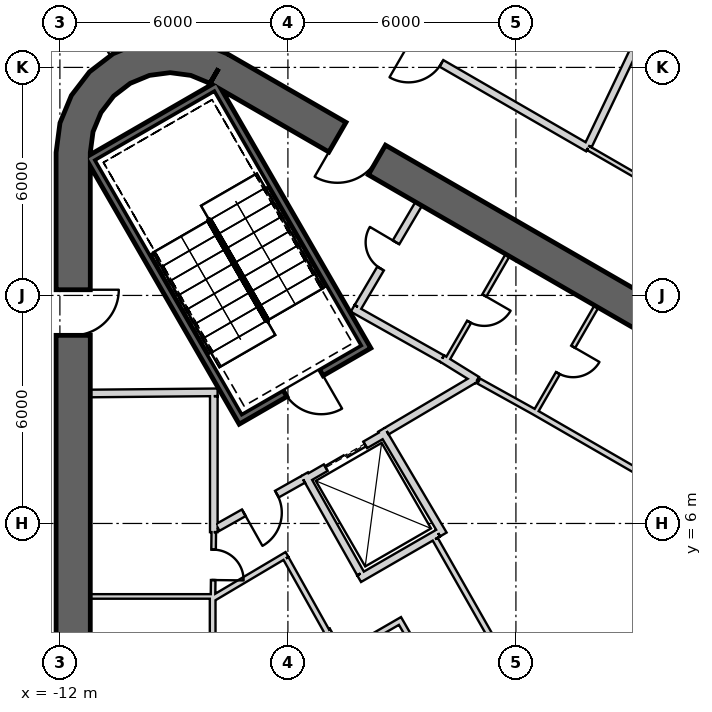
"""IFC4 building model, lengths in metres.
Left out: names, types, materials, properties, quantities, classifications, styles, units other than length and angle.
Written with IfcOpenShell. Run it as: python <this file> out.ifc"""

import sys

from ifc_helpers import new_model, si_unit, direction, frame, frame_2d, origin, place, context, subcontext, project, spatial, polyline, rectangle, outline, extrude, element, fill, save


model = new_model("IFC4")
c1 = context("Model", 3, precision=1e-05, world=origin(), true_north=direction((0.0, 1.0)))
c2 = subcontext(c1, "Body", "Model", "MODEL_VIEW")
j1 = project(units=[si_unit("LENGTHUNIT", "METRE"), si_unit("PLANEANGLEUNIT", "RADIAN")], contexts=[c1])
p1 = place(None, origin())
s1 = spatial("IfcSite", under=j1, at=p1, CompositionType="ELEMENT")
p2 = place(p1, origin())
s2 = spatial("IfcBuilding", under=s1, at=p2, CompositionType="ELEMENT")
p3 = place(p2, frame((0.0, 0.0, 404.8)))
s3 = spatial("IfcBuildingStorey", under=s2, at=p3, CompositionType="ELEMENT", Elevation=404.8)
p4 = place(p3, frame((19.475, 2.208, 0.0), z_axis=(0.0, 0.0, 1.0), x_axis=(-0.866028369851, 0.499994862586, 0.0)))
e1 = element("IfcWall", 1, at=p4, inside=s3, PredefinedType="SHEAR", context=c2, shape_type="SweptSolid", body=[
    extrude(rectangle(XDim=31.523, YDim=0.9, at=frame_2d((15.762, 0.0))), origin(), (0.0, 0.0, 1.0), 5.5),
])
p5 = place(p4, frame((3.612, 0.0, 0.0)))
e2 = element("IfcOpeningElement", 2, at=p5, cuts=e1, PredefinedType="OPENING", context=c2, shape_type="SweptSolid", body=[
    extrude(rectangle(XDim=1.2, YDim=2.4, at=frame_2d((0.6, 1.2))), frame((0.0, 0.46, 0.0), z_axis=(0.0, -1.0, 0.0), x_axis=(1.0, 0.0, 0.0)), (0.0, 0.0, 1.0), 0.92),
])
p6 = place(p4, frame((26.712, 0.0, 0.0)))
e3 = element("IfcOpeningElement", 3, at=p6, cuts=e1, PredefinedType="OPENING", context=c2, shape_type="SweptSolid", body=[
    extrude(rectangle(XDim=1.2, YDim=2.4, at=frame_2d((0.6, 1.2))), frame((0.0, 0.46, 0.0), z_axis=(0.0, -1.0, 0.0), x_axis=(1.0, 0.0, 0.0)), (0.0, 0.0, 1.0), 0.92),
])
p7 = place(p3, frame((-11.65, 15.762, 0.0), z_axis=(0.0, 0.0, 1.0), x_axis=(0.0, -1.0, 0.0)))
e4 = element("IfcWall", 4, at=p7, inside=s3, PredefinedType="SHEAR", context=c2, shape_type="SweptSolid", body=[
    extrude(rectangle(XDim=31.523, YDim=0.9, at=frame_2d((15.762, 0.0))), origin(), (0.0, 0.0, 1.0), 5.5),
])
p8 = place(p7, frame((3.612, 0.0, 0.0)))
e5 = element("IfcOpeningElement", 5, at=p8, cuts=e4, PredefinedType="OPENING", context=c2, shape_type="SweptSolid", body=[
    extrude(rectangle(XDim=1.2, YDim=2.4, at=frame_2d((0.6, 1.2))), frame((0.0, 0.46, 0.0), z_axis=(0.0, -1.0, 0.0), x_axis=(1.0, 0.0, 0.0)), (0.0, 0.0, 1.0), 0.92),
])
p9 = place(p7, frame((26.712, 0.0, 0.0)))
e6 = element("IfcOpeningElement", 6, at=p9, cuts=e4, PredefinedType="OPENING", context=c2, shape_type="SweptSolid", body=[
    extrude(rectangle(XDim=1.2, YDim=2.4, at=frame_2d((0.6, 1.2))), frame((0.0, 0.46, 0.0), z_axis=(0.0, -1.0, 0.0), x_axis=(1.0, 0.0, 0.0)), (0.0, 0.0, 1.0), 0.92),
])
p10 = place(p3, origin())
e7 = element("IfcWall", 7, at=p10, inside=s3, PredefinedType="SHEAR", context=c2, shape_type="SweptSolid", body=[
    extrude(outline(polyline([(-7.6, 18.36), (-8.323, 18.659), (-9.1, 18.762), (-9.876, 18.659), (-10.6, 18.36), (-11.221, 17.883), (-11.698, 17.262), (-11.998, 16.538), (-12.1, 15.762), (-11.2, 15.762), (-11.128, 16.305), (-10.919, 16.812), (-10.585, 17.247), (-10.15, 17.58), (-9.644, 17.79), (-9.1, 17.862), (-8.556, 17.79), (-8.05, 17.58), (-7.6, 18.36)])), origin(), (0.0, 0.0, 1.0), 5.5),
])
p11 = place(p3, frame((-11.245, 15.678, -0.3), z_axis=(0.0, 0.0, 1.0), x_axis=(0.499977274689, -0.866038523851, 0.0)))
e8 = element("IfcWall", 8, at=p11, inside=s3, PredefinedType="SHEAR", context=c2, shape_type="SweptSolid", body=[
    extrude(rectangle(XDim=8.1, YDim=0.2, at=frame_2d((4.05, 0.0))), origin(), (0.0, 0.0, 1.0), 5.55),
])
p12 = place(p3, frame((-7.818, 17.541, -0.3), z_axis=(0.0, 0.0, 1.0), x_axis=(-0.866044365799, -0.499967155389, 0.0)))
e9 = element("IfcWall", 9, at=p12, inside=s3, PredefinedType="SHEAR", context=c2, shape_type="SweptSolid", body=[
    extrude(rectangle(XDim=3.8, YDim=0.2, at=frame_2d((1.9, 0.0))), origin(), (0.0, 0.0, 1.0), 5.55),
])
p13 = place(p3, frame((-7.854, 17.405, -0.3), z_axis=(0.0, 0.0, 1.0), x_axis=(0.499997992926, -0.866026562566, 0.0)))
e10 = element("IfcWall", 10, at=p13, inside=s3, PredefinedType="SHEAR", context=c2, shape_type="SweptSolid", body=[
    extrude(rectangle(XDim=7.9, YDim=0.2, at=frame_2d((3.95, 0.0))), origin(), (0.0, 0.0, 1.0), 5.55),
])
p14 = place(p3, frame((-7.159, 8.8, -0.3), z_axis=(0.0, 0.0, 1.0), x_axis=(0.866047807691, 0.499961193289, 0.0)))
e11 = element("IfcWall", 11, at=p14, inside=s3, PredefinedType="SHEAR", context=c2, shape_type="SweptSolid", body=[
    extrude(rectangle(XDim=3.6, YDim=0.2, at=frame_2d((1.8, 0.0))), origin(), (0.0, 0.0, 1.0), 5.55),
])
p15 = place(p14, frame((1.25, 0.0, 0.3)))
e12 = element("IfcOpeningElement", 12, at=p15, cuts=e11, PredefinedType="OPENING", context=c2, shape_type="SweptSolid", body=[
    extrude(rectangle(XDim=1.1, YDim=2.1, at=frame_2d((0.55, 1.05))), frame((0.0, 0.11, 0.0), z_axis=(0.0, -1.0, 0.0), x_axis=(1.0, 0.0, 0.0)), (0.0, 0.0, 1.0), 0.22),
])
p16 = place(p3, frame((-5.524, 7.168, 0.0), z_axis=(0.0, 0.0, 1.0), x_axis=(0.866024647952, 0.500001309137, 0.0)))
e13 = element("IfcWall", 13, at=p16, inside=s3, PredefinedType="PLUMBINGWALL", context=c2, shape_type="SweptSolid", body=[
    extrude(rectangle(XDim=2.4, YDim=0.2, at=frame_2d((1.2, 0.0))), origin(), (0.0, 0.0, 1.0), 5.25),
])
p17 = place(p16, frame((0.6, 0.0, 0.0)))
e14 = element("IfcOpeningElement", 14, at=p17, cuts=e13, PredefinedType="OPENING", context=c2, shape_type="SweptSolid", body=[
    extrude(rectangle(XDim=1.2, YDim=2.4, at=frame_2d((0.6, 1.2))), frame((0.0, 0.11, 0.0), z_axis=(0.0, -1.0, 0.0), x_axis=(1.0, 0.0, 0.0)), (0.0, 0.0, 1.0), 0.22),
])
p18 = place(p3, frame((-3.538, 8.465, 0.0), z_axis=(0.0, 0.0, 1.0), x_axis=(0.508616218331, -0.860993346345, 0.0)))
e15 = element("IfcWall", 15, at=p18, inside=s3, PredefinedType="PLUMBINGWALL", context=c2, shape_type="SweptSolid", body=[
    extrude(rectangle(XDim=3.2, YDim=0.2, at=frame_2d((1.6, 0.0))), origin(), (0.0, 0.0, 1.0), 5.25),
])
p19 = place(p3, frame((-2.047, 5.746, 0.0), z_axis=(0.0, 0.0, 1.0), x_axis=(-0.866024647952, -0.500001309137, 0.0)))
e16 = element("IfcWall", 16, at=p19, inside=s3, PredefinedType="PLUMBINGWALL", context=c2, shape_type="SweptSolid", body=[
    extrude(rectangle(XDim=2.4, YDim=0.2, at=frame_2d((1.2, 0.0))), origin(), (0.0, 0.0, 1.0), 5.25),
])
p20 = place(p3, frame((-5.562, 7.296, 0.0), z_axis=(0.0, 0.0, 1.0), x_axis=(0.49134651263, -0.870964180966, 0.0)))
e17 = element("IfcWall", 17, at=p20, inside=s3, PredefinedType="PLUMBINGWALL", context=c2, shape_type="SweptSolid", body=[
    extrude(rectangle(XDim=3.0, YDim=0.2, at=frame_2d((1.5, 0.0))), origin(), (0.0, 0.0, 1.0), 5.25),
])
p21 = place(p3, frame((-7.95, 4.08, 0.0), z_axis=(0.0, 0.0, 1.0), x_axis=(-1.0, 0.0, 0.0)))
e18 = element("IfcWall", 18, at=p21, inside=s3, PredefinedType="PARTITIONING", context=c2, shape_type="SweptSolid", body=[
    extrude(rectangle(XDim=3.25, YDim=0.12, at=frame_2d((1.625, 0.0))), origin(), (0.0, 0.0, 1.0), 5.25),
])
p22 = place(p3, frame((-7.85, 9.451, 0.0), z_axis=(0.0, 0.0, 1.0), x_axis=(-0.999957167047, -0.009255488683, 0.0)))
e19 = element("IfcWall", 19, at=p22, inside=s3, PredefinedType="PARTITIONING", context=c2, shape_type="SweptSolid", body=[
    extrude(rectangle(XDim=3.35, YDim=0.2, at=frame_2d((1.675, 0.0))), origin(), (0.0, 0.0, 1.0), 5.25),
])
p23 = place(p3, frame((-7.95, 5.772, 0.0), z_axis=(0.0, 0.0, 1.0), x_axis=(0.0, 1.0, 0.0)))
e20 = element("IfcWall", 20, at=p23, inside=s3, PredefinedType="PARTITIONING", context=c2, shape_type="SweptSolid", body=[
    extrude(rectangle(XDim=3.578, YDim=0.2, at=frame_2d((1.789, 0.0))), origin(), (0.0, 0.0, 1.0), 5.25),
])
p24 = place(p3, frame((-7.971, 4.05, 0.0), z_axis=(0.0, 0.0, 1.0), x_axis=(0.012047318415, 0.999927428426, 0.0)))
e21 = element("IfcWall", 21, at=p24, inside=s3, PredefinedType="PARTITIONING", context=c2, shape_type="SweptSolid", body=[
    extrude(rectangle(XDim=1.723, YDim=0.12, at=frame_2d((0.861, 0.0))), origin(), (0.0, 0.0, 1.0), 5.25),
])
p25 = place(p24, frame((0.461, 0.0, 0.0)))
e22 = element("IfcOpeningElement", 22, at=p25, cuts=e21, PredefinedType="OPENING", context=c2, shape_type="SweptSolid", body=[
    extrude(rectangle(XDim=0.8, YDim=2.1, at=frame_2d((0.4, 1.05))), frame((0.0, 0.07, 0.0), z_axis=(0.0, -1.0, 0.0), x_axis=(1.0, 0.0, 0.0)), (0.0, 0.0, 1.0), 0.14),
])
p26 = place(p3, frame((-7.98, 4.05, 0.0), z_axis=(0.0, 0.0, 1.0), x_axis=(0.0, -1.0, 0.0)))
e23 = element("IfcWall", 23, at=p26, inside=s3, PredefinedType="PLUMBINGWALL", context=c2, shape_type="SweptSolid", body=[
    extrude(rectangle(XDim=8.1, YDim=0.15, at=frame_2d((4.05, 0.0))), origin(), (0.0, 0.0, 1.0), 5.25),
])
p27 = place(p26, frame((3.65, 0.0, 0.0)))
e24 = element("IfcOpeningElement", 24, at=p27, cuts=e23, PredefinedType="OPENING", context=c2, shape_type="SweptSolid", body=[
    extrude(rectangle(XDim=0.8, YDim=2.1, at=frame_2d((0.4, 1.05))), frame((0.0, 0.085, 0.0), z_axis=(0.0, -1.0, 0.0), x_axis=(1.0, 0.0, 0.0)), (0.0, 0.0, 1.0), 0.17),
])
p28 = place(p3, frame((2.119, 11.709, 0.0), z_axis=(0.0, 0.0, 1.0), x_axis=(-0.500017246033, -0.866015446554, 0.0)))
e25 = element("IfcWall", 25, at=p28, inside=s3, PredefinedType="PARTITIONING", context=c2, shape_type="SweptSolid", body=[
    extrude(rectangle(XDim=3.25, YDim=0.12, at=frame_2d((1.625, 0.0))), origin(), (0.0, 0.0, 1.0), 5.25),
])
p29 = place(p28, frame((1.225, 0.0, 0.0)))
e26 = element("IfcOpeningElement", 26, at=p29, cuts=e25, PredefinedType="OPENING", context=c2, shape_type="SweptSolid", body=[
    extrude(rectangle(XDim=0.8, YDim=2.1, at=frame_2d((0.4, 1.05))), frame((0.0, 0.07, 0.0), z_axis=(0.0, -1.0, 0.0), x_axis=(1.0, 0.0, 0.0)), (0.0, 0.0, 1.0), 0.14),
])
p30 = place(p3, frame((7.497, 4.886, 0.0), z_axis=(0.0, 0.0, 1.0), x_axis=(-0.866030989016, 0.499990325971, 0.0)))
e27 = element("IfcWall", 27, at=p30, inside=s3, PredefinedType="PLUMBINGWALL", context=c2, shape_type="SweptSolid", body=[
    extrude(rectangle(XDim=8.1, YDim=0.15, at=frame_2d((4.05, 0.0))), origin(), (0.0, 0.0, 1.0), 5.25),
])
p31 = place(p30, frame((3.65, 0.0, 0.0)))
e28 = element("IfcOpeningElement", 28, at=p31, cuts=e27, PredefinedType="OPENING", context=c2, shape_type="SweptSolid", body=[
    extrude(rectangle(XDim=0.8, YDim=2.1, at=frame_2d((0.4, 1.05))), frame((0.0, 0.085, 0.0), z_axis=(0.0, -1.0, 0.0), x_axis=(1.0, 0.0, 0.0)), (0.0, 0.0, 1.0), 0.17),
])
p32 = place(p3, frame((-0.22, 13.06, 0.0), z_axis=(0.0, 0.0, 1.0), x_axis=(-0.499984717929, -0.866034226713, 0.0)))
e29 = element("IfcWall", 29, at=p32, inside=s3, PredefinedType="PARTITIONING", context=c2, shape_type="SweptSolid", body=[
    extrude(rectangle(XDim=3.25, YDim=0.12, at=frame_2d((1.625, 0.0))), origin(), (0.0, 0.0, 1.0), 5.25),
])
p33 = place(p32, frame((1.225, 0.0, 0.0)))
e30 = element("IfcOpeningElement", 30, at=p33, cuts=e29, PredefinedType="OPENING", context=c2, shape_type="SweptSolid", body=[
    extrude(rectangle(XDim=0.8, YDim=2.1, at=frame_2d((0.4, 1.05))), frame((0.0, 0.07, 0.0), z_axis=(0.0, -1.0, 0.0), x_axis=(1.0, 0.0, 0.0)), (0.0, 0.0, 1.0), 0.14),
])
p34 = place(p3, frame((-1.941, 10.339, 0.0), z_axis=(0.0, 0.0, 1.0), x_axis=(0.850216889117, -0.526432561171, 0.0)))
e31 = element("IfcWall", 31, at=p34, inside=s3, PredefinedType="PARTITIONING", context=c2, shape_type="SweptSolid", body=[
    extrude(rectangle(XDim=1.078, YDim=0.2, at=frame_2d((0.539, 0.0))), origin(), (0.0, 0.0, 1.0), 5.25),
])
p35 = place(p3, frame((0.483, 8.936, 0.0), z_axis=(0.0, 0.0, 1.0), x_axis=(-0.874315691004, 0.485357674776, 0.0)))
e32 = element("IfcWall", 32, at=p35, inside=s3, PredefinedType="PLUMBINGWALL", context=c2, shape_type="SweptSolid", body=[
    extrude(rectangle(XDim=1.671, YDim=0.15, at=frame_2d((0.836, 0.0))), origin(), (0.0, 0.0, 1.0), 5.25),
])
p36 = place(p3, frame((-4.296, 11.659, 0.0), z_axis=(0.0, 0.0, 1.0), x_axis=(0.871534483978, -0.490334215854, 0.0)))
e33 = element("IfcWall", 33, at=p36, inside=s3, PredefinedType="PARTITIONING", context=c2, shape_type="SweptSolid", body=[
    extrude(rectangle(XDim=2.7, YDim=0.2, at=frame_2d((1.35, 0.0))), origin(), (0.0, 0.0, 1.0), 5.25),
])
p37 = place(p3, frame((-2.558, 14.409, 0.0), z_axis=(0.0, 0.0, 1.0), x_axis=(-0.508018930956, -0.861345903683, 0.0)))
e34 = element("IfcWall", 34, at=p37, inside=s3, PredefinedType="PARTITIONING", context=c2, shape_type="SweptSolid", body=[
    extrude(rectangle(XDim=3.15, YDim=0.2, at=frame_2d((1.575, 0.0))), origin(), (0.0, 0.0, 1.0), 5.25),
])
p38 = place(p37, frame((1.175, 0.0, 0.0)))
e35 = element("IfcOpeningElement", 35, at=p38, cuts=e34, PredefinedType="OPENING", context=c2, shape_type="SweptSolid", body=[
    extrude(rectangle(XDim=0.8, YDim=2.1, at=frame_2d((0.4, 1.05))), frame((0.0, 0.11, 0.0), z_axis=(0.0, -1.0, 0.0), x_axis=(1.0, 0.0, 0.0)), (0.0, 0.0, 1.0), 0.22),
])
p39 = place(p3, frame((-1.056, 9.818, 0.0), z_axis=(0.0, 0.0, 1.0), x_axis=(-0.860599924646, -0.509281621207, 0.0)))
e36 = element("IfcWall", 36, at=p39, inside=s3, PredefinedType="PARTITIONING", context=c2, shape_type="SweptSolid", body=[
    extrude(rectangle(XDim=2.725, YDim=0.2, at=frame_2d((1.362, 0.0))), origin(), (0.0, 0.0, 1.0), 5.25),
])
p40 = place(p3, frame((-5.6, 7.16, 0.0), z_axis=(0.0, 0.0, 1.0), x_axis=(-0.871350695252, -0.490660744185, 0.0)))
e37 = element("IfcWall", 37, at=p40, inside=s3, PredefinedType="PARTITIONING", context=c2, shape_type="SweptSolid", body=[
    extrude(rectangle(XDim=2.582, YDim=0.2, at=frame_2d((1.291, 0.0))), origin(), (0.0, 0.0, 1.0), 5.25),
])
p41 = place(p40, frame((0.791, 0.0, 0.0)))
e38 = element("IfcOpeningElement", 38, at=p41, cuts=e37, PredefinedType="OPENING", context=c2, shape_type="SweptSolid", body=[
    extrude(rectangle(XDim=1.0, YDim=2.1, at=frame_2d((0.5, 1.05))), frame((0.0, 0.11, 0.0), z_axis=(0.0, -1.0, 0.0), x_axis=(1.0, 0.0, 0.0)), (0.0, 0.0, 1.0), 0.22),
])
p42 = place(p3, frame((-2.124, 5.586, 0.0), z_axis=(0.0, 0.0, 1.0), x_axis=(0.494514430604, -0.869169418424, 0.0)))
e39 = element("IfcWall", 39, at=p42, inside=s3, PredefinedType="PLUMBINGWALL", context=c2, shape_type="SweptSolid", body=[
    extrude(rectangle(XDim=4.534, YDim=0.15, at=frame_2d((2.267, 0.0))), origin(), (0.0, 0.0, 1.0), 5.25),
])
p43 = place(p3, frame((-4.985, -3.235, 0.0), z_axis=(0.0, 0.0, 1.0), x_axis=(0.0, 1.0, 0.0)))
e40 = element("IfcWall", 40, at=p43, inside=s3, PredefinedType="PLUMBINGWALL", context=c2, shape_type="SweptSolid", body=[
    extrude(rectangle(XDim=6.469, YDim=0.15, at=frame_2d((3.235, 0.0))), origin(), (0.0, 0.0, 1.0), 5.25),
])
p44 = place(p3, frame((-6.024, 5.183, 0.0), z_axis=(0.0, 0.0, 1.0), x_axis=(-0.860126804455, -0.510080268447, 0.0)))
e41 = element("IfcWall", 41, at=p44, inside=s3, PredefinedType="PLUMBINGWALL", context=c2, shape_type="SweptSolid", body=[
    extrude(rectangle(XDim=2.24, YDim=0.15, at=frame_2d((1.12, 0.0))), origin(), (0.0, 0.0, 1.0), 5.25),
])
p45 = place(p3, frame((-4.983, 3.172, 0.0), z_axis=(0.0, 0.0, 1.0), x_axis=(-0.488701962514, 0.872450796226, 0.0)))
e42 = element("IfcWall", 42, at=p45, inside=s3, PredefinedType="PLUMBINGWALL", context=c2, shape_type="SweptSolid", body=[
    extrude(rectangle(XDim=2.187, YDim=0.15, at=frame_2d((1.093, 0.0))), origin(), (0.0, 0.0, 1.0), 5.25),
])
p46 = place(p3, frame((-4.551, 2.482, 0.0), z_axis=(0.0, 0.0, 1.0), x_axis=(-0.499852395195, 0.866110606688, 0.0)))
e43 = element("IfcWall", 43, at=p46, inside=s3, PredefinedType="PLUMBINGWALL", context=c2, shape_type="SweptSolid", body=[
    extrude(rectangle(XDim=0.813, YDim=0.15, at=frame_2d((0.407, 0.0))), origin(), (0.0, 0.0, 1.0), 5.25),
])
p47 = place(p3, frame((-2.986, 3.472, 0.0), z_axis=(0.0, 0.0, 1.0), x_axis=(-0.866059624469, -0.499940723351, 0.0)))
e44 = element("IfcWall", 44, at=p47, inside=s3, PredefinedType="PLUMBINGWALL", context=c2, shape_type="SweptSolid", body=[
    extrude(rectangle(XDim=1.775, YDim=0.15, at=frame_2d((0.888, 0.0))), origin(), (0.0, 0.0, 1.0), 5.25),
])
p48 = place(p3, frame((-1.407, 0.587, 0.0), z_axis=(0.0, 0.0, 1.0), x_axis=(-0.500029427677, 0.866008413041, 0.0)))
e45 = element("IfcWall", 45, at=p48, inside=s3, PredefinedType="PLUMBINGWALL", context=c2, shape_type="SweptSolid", body=[
    extrude(rectangle(XDim=3.213, YDim=0.15, at=frame_2d((1.606, 0.0))), origin(), (0.0, 0.0, 1.0), 5.25),
])
p49 = place(p3, frame((-11.849, 20.463, 0.0), z_axis=(0.0, 0.0, 1.0), x_axis=(0.500047596559, -0.865997922154, 0.0)))
e46 = element("IfcWall", 46, at=p49, inside=s3, PredefinedType="PARTITIONING", context=c2, shape_type="SweptSolid", body=[
    extrude(rectangle(XDim=2.6, YDim=0.12, at=frame_2d((1.3, 0.0))), origin(), (0.0, 0.0, 1.0), 3.02),
])
p50 = place(p3, frame((21.518, 4.551, 0.0), z_axis=(0.0, 0.0, 1.0), x_axis=(-0.866022813823, 0.500004485919, 0.0)))
e47 = element("IfcWall", 47, at=p50, inside=s3, PredefinedType="PARTITIONING", context=c2, shape_type="SweptSolid", body=[
    extrude(rectangle(XDim=22.655, YDim=0.12, at=frame_2d((11.327, 0.0))), origin(), (0.0, 0.0, 1.0), 5.25),
])
p51 = place(p50, frame((10.86, 0.0, 0.0)))
e48 = element("IfcOpeningElement", 48, at=p51, cuts=e47, PredefinedType="OPENING", context=c2, shape_type="SweptSolid", body=[
    extrude(rectangle(XDim=1.0, YDim=2.1, at=frame_2d((0.5, 1.05))), frame((0.0, 0.07, 0.0), z_axis=(0.0, -1.0, 0.0), x_axis=(1.0, 0.0, 0.0)), (0.0, 0.0, 1.0), 0.14),
])
p52 = place(p3, frame((1.898, 15.878, 0.0), z_axis=(0.0, 0.0, 1.0), x_axis=(-0.866032067792, 0.499988457423, 0.0)))
e49 = element("IfcWall", 49, at=p52, inside=s3, PredefinedType="PARTITIONING", context=c2, shape_type="SweptSolid", body=[
    extrude(rectangle(XDim=9.905, YDim=0.2, at=frame_2d((4.952, 0.0))), origin(), (0.0, 0.0, 1.0), 5.25),
])
p53 = place(p52, frame((4.456, 0.0, 0.0)))
e50 = element("IfcOpeningElement", 50, at=p53, cuts=e49, PredefinedType="OPENING", context=c2, shape_type="SweptSolid", body=[
    extrude(rectangle(XDim=1.0, YDim=2.1, at=frame_2d((0.5, 1.05))), frame((0.0, 0.11, 0.0), z_axis=(0.0, -1.0, 0.0), x_axis=(1.0, 0.0, 0.0)), (0.0, 0.0, 1.0), 0.22),
])
p54 = place(p3, frame((4.207, 20.766, 0.0), z_axis=(0.0, 0.0, 1.0), x_axis=(-0.431059382244, -0.902323561135, 0.0)))
e51 = element("IfcWall", 51, at=p54, inside=s3, PredefinedType="PARTITIONING", context=c2, shape_type="SweptSolid", body=[
    extrude(rectangle(XDim=5.344, YDim=0.2, at=frame_2d((2.672, 0.0))), origin(), (0.0, 0.0, 1.0), 5.25),
])
p55 = place(p15, origin())
e52 = element("IfcDoor", 52, at=p55, inside=s3, OperationType="SINGLE_SWING_RIGHT", PredefinedType="USERDEFINED", context=c2, shape_type="SweptSolid", body=[
    extrude(rectangle(XDim=1.1, YDim=2.1, at=frame_2d((0.55, 1.05))), frame((0.0, 0.025, 0.0), z_axis=(0.0, -1.0, 0.0), x_axis=(1.0, 0.0, 0.0)), (0.0, 0.0, 1.0), 0.05),
])
fill(e12, e52)
p56 = place(p41, origin())
e53 = element("IfcDoor", 53, at=p56, inside=s3, OperationType="SINGLE_SWING_RIGHT", PredefinedType="USERDEFINED", context=c2, shape_type="SweptSolid", body=[
    extrude(rectangle(XDim=1.0, YDim=2.1, at=frame_2d((0.5, 1.05))), frame((0.0, 0.025, 0.0), z_axis=(0.0, -1.0, 0.0), x_axis=(1.0, 0.0, 0.0)), (0.0, 0.0, 1.0), 0.05),
])
fill(e38, e53)
p57 = place(p17, origin())
e54 = element("IfcDoor", 54, at=p57, inside=s3, OperationType="SLIDING_TO_LEFT", PredefinedType="USERDEFINED", context=c2, shape_type="SweptSolid", body=[
    extrude(rectangle(XDim=1.2, YDim=2.4, at=frame_2d((0.6, 1.2))), frame((0.0, 0.025, 0.0), z_axis=(0.0, -1.0, 0.0), x_axis=(1.0, 0.0, 0.0)), (0.0, 0.0, 1.0), 0.05),
])
fill(e14, e54)
p58 = place(p25, origin())
e55 = element("IfcDoor", 55, at=p58, inside=s3, OperationType="SINGLE_SWING_LEFT", PredefinedType="USERDEFINED", context=c2, shape_type="SweptSolid", body=[
    extrude(rectangle(XDim=0.8, YDim=2.1, at=frame_2d((0.4, 1.05))), frame((0.0, 0.025, 0.0), z_axis=(0.0, -1.0, 0.0), x_axis=(1.0, 0.0, 0.0)), (0.0, 0.0, 1.0), 0.05),
])
fill(e22, e55)
p59 = place(p29, origin())
e56 = element("IfcDoor", 56, at=p59, inside=s3, OperationType="SINGLE_SWING_LEFT", PredefinedType="USERDEFINED", context=c2, shape_type="SweptSolid", body=[
    extrude(rectangle(XDim=0.8, YDim=2.1, at=frame_2d((0.4, 1.05))), frame((0.0, 0.025, 0.0), z_axis=(0.0, -1.0, 0.0), x_axis=(1.0, 0.0, 0.0)), (0.0, 0.0, 1.0), 0.05),
])
fill(e26, e56)
p60 = place(p33, origin())
e57 = element("IfcDoor", 57, at=p60, inside=s3, OperationType="SINGLE_SWING_LEFT", PredefinedType="USERDEFINED", context=c2, shape_type="SweptSolid", body=[
    extrude(rectangle(XDim=0.8, YDim=2.1, at=frame_2d((0.4, 1.05))), frame((0.0, 0.025, 0.0), z_axis=(0.0, -1.0, 0.0), x_axis=(1.0, 0.0, 0.0)), (0.0, 0.0, 1.0), 0.05),
])
fill(e30, e57)
p61 = place(p38, origin())
e58 = element("IfcDoor", 58, at=p61, inside=s3, OperationType="SINGLE_SWING_LEFT", PredefinedType="USERDEFINED", context=c2, shape_type="SweptSolid", body=[
    extrude(rectangle(XDim=0.8, YDim=2.1, at=frame_2d((0.4, 1.05))), frame((0.0, 0.025, 0.0), z_axis=(0.0, -1.0, 0.0), x_axis=(1.0, 0.0, 0.0)), (0.0, 0.0, 1.0), 0.05),
])
fill(e35, e58)
p62 = place(p53, origin())
e59 = element("IfcDoor", 59, at=p62, inside=s3, OperationType="SINGLE_SWING_RIGHT", PredefinedType="USERDEFINED", context=c2, shape_type="SweptSolid", body=[
    extrude(rectangle(XDim=1.0, YDim=2.1, at=frame_2d((0.5, 1.05))), frame((0.0, 0.025, 0.0), z_axis=(0.0, -1.0, 0.0), x_axis=(1.0, 0.0, 0.0)), (0.0, 0.0, 1.0), 0.05),
])
fill(e50, e59)
p63 = place(p6, origin())
e60 = element("IfcDoor", 60, at=p63, inside=s3, OperationType="SINGLE_SWING_RIGHT", PredefinedType="USERDEFINED", context=c2, shape_type="SweptSolid", body=[
    extrude(rectangle(XDim=1.2, YDim=2.4, at=frame_2d((0.6, 1.2))), frame((0.0, 0.025, 0.0), z_axis=(0.0, -1.0, 0.0), x_axis=(1.0, 0.0, 0.0)), (0.0, 0.0, 1.0), 0.05),
])
fill(e3, e60)
p64 = place(p8, origin())
e61 = element("IfcDoor", 61, at=p64, inside=s3, OperationType="SINGLE_SWING_LEFT", PredefinedType="USERDEFINED", context=c2, shape_type="SweptSolid", body=[
    extrude(rectangle(XDim=1.2, YDim=2.4, at=frame_2d((0.6, 1.2))), frame((0.0, 0.025, 0.0), z_axis=(0.0, -1.0, 0.0), x_axis=(1.0, 0.0, 0.0)), (0.0, 0.0, 1.0), 0.05),
])
fill(e5, e61)
save(model, sys.argv[1])
